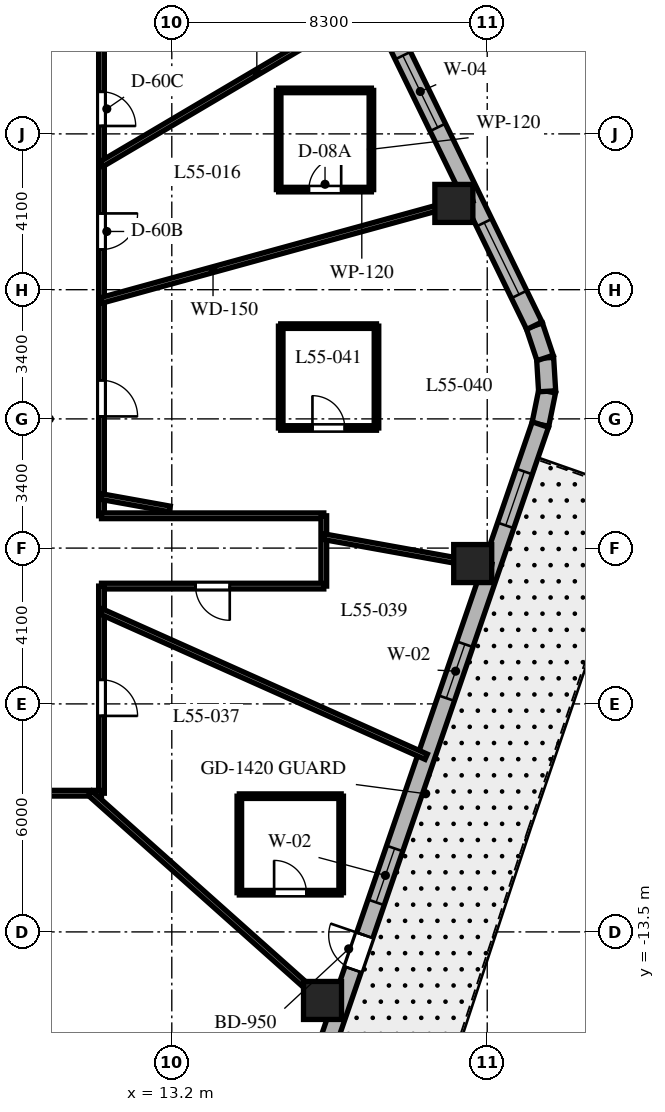
"""IFC4 building model, lengths in metres.
Left out: names, types, materials, properties, quantities, classifications, styles, units other than length and angle.
Written with IfcOpenShell. Run it as: python <this file> out.ifc"""

import sys

from ifc_helpers import new_model, si_unit, direction, frame, frame_2d, origin, origin_2d, place, context, subcontext, project, spatial, rectangle, extrude, element, fill, save


model = new_model("IFC4")
c1 = context("Model", 3, precision=1e-05, world=origin(), true_north=direction((0.0, 1.0)))
c2 = subcontext(c1, "Body", "Model", "MODEL_VIEW")
j1 = project(units=[si_unit("LENGTHUNIT", "METRE"), si_unit("PLANEANGLEUNIT", "RADIAN")], contexts=[c1])
p1 = place(None, origin())
s1 = spatial("IfcSite", under=j1, at=p1, CompositionType="ELEMENT")
p2 = place(p1, origin())
s2 = spatial("IfcBuilding", under=s1, at=p2, CompositionType="ELEMENT")
p3 = place(p2, frame((0.0, 0.0, 221.7)))
s3 = spatial("IfcBuildingStorey", under=s2, at=p3, CompositionType="ELEMENT", Elevation=221.7)
for number, where, z_axis, x_axis in (
    (1, (17.166, -15.304, 0.0), (0.0, 0.0, 1.0), (1.0, 0.0, 0.0)),
    (2, (21.118, -3.807, 0.0), (0.0, 0.0, 1.0), (1.0, 0.0, 0.0)),
    (3, (20.622, 5.67, 0.0), (0.0, 0.0, 1.0), (1.0, 0.0, 0.0)),
):
    element("IfcColumn", number, at=place(p3, frame(where, z_axis=z_axis, x_axis=x_axis)), inside=s3, PredefinedType="COLUMN", context=c2, shape_type="SweptSolid", body=[
        extrude(rectangle(XDim=1.0, YDim=1.0, at=origin_2d()), origin(), (0.0, 0.0, 1.0), 3.8),
    ])
p4 = place(p3, frame((22.898, -0.15, 0.0), z_axis=(0.0, 0.0, 1.0), x_axis=(0.199055826889, 0.979988151858, 0.0)))
e4 = element("IfcWall", 4, at=p4, inside=s3, PredefinedType="SOLIDWALL", context=c2, shape_type="SweptSolid", body=[
    extrude(rectangle(XDim=0.894, YDim=0.45, at=frame_2d((0.447, 0.0))), origin(), (0.0, 0.0, 1.0), 3.5),
])
p5 = place(p3, frame((23.076, 0.727, 0.0), z_axis=(0.0, 0.0, 1.0), x_axis=(-0.060805222108, 0.998149650586, 0.0)))
e5 = element("IfcWall", 5, at=p5, inside=s3, PredefinedType="SOLIDWALL", context=c2, shape_type="SweptSolid", body=[
    extrude(rectangle(XDim=0.879, YDim=0.45, at=frame_2d((0.44, 0.0))), origin(), (0.0, 0.0, 1.0), 3.5),
])
p6 = place(p3, frame((23.023, 1.604, 0.0), z_axis=(0.0, 0.0, 1.0), x_axis=(-0.316801227695, 0.948491951537, 0.0)))
e6 = element("IfcWall", 6, at=p6, inside=s3, PredefinedType="SOLIDWALL", context=c2, shape_type="SweptSolid", body=[
    extrude(rectangle(XDim=0.894, YDim=0.45, at=frame_2d((0.447, 0.0))), origin(), (0.0, 0.0, 1.0), 3.5),
])
p7 = place(p3, frame((16.324, -19.275, 0.0), z_axis=(0.0, 0.0, 1.0), x_axis=(0.325083142304, 0.945685439557, 0.0)))
e7 = element("IfcWall", 7, at=p7, inside=s3, PredefinedType="SOLIDWALL", context=c2, shape_type="SweptSolid", body=[
    extrude(rectangle(XDim=20.224, YDim=0.45, at=frame_2d((10.112, 0.0))), origin(), (0.0, 0.0, 1.0), 3.5),
])
p8 = place(p7, frame((5.062, 0.0, 0.0)))
e8 = element("IfcOpeningElement", 8, at=p8, cuts=e7, PredefinedType="OPENING", context=c2, shape_type="SweptSolid", body=[
    extrude(rectangle(XDim=0.95, YDim=2.15, at=frame_2d((0.475, 1.075))), frame((0.0, 0.235, 0.0), z_axis=(0.0, -1.0, 0.0), x_axis=(1.0, 0.0, 0.0)), (0.0, 0.0, 1.0), 0.47),
])
p9 = place(p7, frame((1.253, 0.0, 0.8)))
e9 = element("IfcOpeningElement", 9, at=p9, cuts=e7, PredefinedType="OPENING", context=c2, shape_type="SweptSolid", body=[
    extrude(rectangle(XDim=1.5, YDim=1.8, at=frame_2d((0.75, 0.9))), frame((0.0, 0.235, 0.0), z_axis=(0.0, -1.0, 0.0), x_axis=(1.0, 0.0, 0.0)), (0.0, 0.0, 1.0), 0.47),
])
p10 = place(p7, frame((6.929, 0.0, 0.8)))
e10 = element("IfcOpeningElement", 10, at=p10, cuts=e7, PredefinedType="OPENING", context=c2, shape_type="SweptSolid", body=[
    extrude(rectangle(XDim=1.5, YDim=1.8, at=frame_2d((0.75, 0.9))), frame((0.0, 0.235, 0.0), z_axis=(0.0, -1.0, 0.0), x_axis=(1.0, 0.0, 0.0)), (0.0, 0.0, 1.0), 0.47),
])
p11 = place(p7, frame((12.612, 0.0, 0.8)))
e11 = element("IfcOpeningElement", 11, at=p11, cuts=e7, PredefinedType="OPENING", context=c2, shape_type="SweptSolid", body=[
    extrude(rectangle(XDim=1.5, YDim=1.8, at=frame_2d((0.75, 0.9))), frame((0.0, 0.235, 0.0), z_axis=(0.0, -1.0, 0.0), x_axis=(1.0, 0.0, 0.0)), (0.0, 0.0, 1.0), 0.47),
])
p12 = place(p7, frame((17.418, 0.0, 0.8)))
e12 = element("IfcOpeningElement", 12, at=p12, cuts=e7, PredefinedType="OPENING", context=c2, shape_type="SweptSolid", body=[
    extrude(rectangle(XDim=1.5, YDim=1.8, at=frame_2d((0.75, 0.9))), frame((0.0, 0.235, 0.0), z_axis=(0.0, -1.0, 0.0), x_axis=(1.0, 0.0, 0.0)), (0.0, 0.0, 1.0), 0.47),
])
p13 = place(p3, frame((22.74, 2.452, 0.0), z_axis=(0.0, 0.0, 1.0), x_axis=(-0.437753424814, 0.899095066755, 0.0)))
e13 = element("IfcWall", 13, at=p13, inside=s3, PredefinedType="SOLIDWALL", context=c2, shape_type="SweptSolid", body=[
    extrude(rectangle(XDim=19.137, YDim=0.45, at=frame_2d((9.569, 0.0))), origin(), (0.0, 0.0, 1.0), 3.5),
])
p14 = place(p13, frame((5.805, 0.0, 0.8)))
e14 = element("IfcOpeningElement", 14, at=p14, cuts=e13, PredefinedType="OPENING", context=c2, shape_type="SweptSolid", body=[
    extrude(rectangle(XDim=2.1, YDim=1.85, at=frame_2d((1.05, 0.925))), frame((0.0, 0.235, 0.0), z_axis=(0.0, -1.0, 0.0), x_axis=(1.0, 0.0, 0.0)), (0.0, 0.0, 1.0), 0.47),
])
p15 = place(p13, frame((11.199, 0.0, 0.8)))
e15 = element("IfcOpeningElement", 15, at=p15, cuts=e13, PredefinedType="OPENING", context=c2, shape_type="SweptSolid", body=[
    extrude(rectangle(XDim=2.1, YDim=1.85, at=frame_2d((1.05, 0.925))), frame((0.0, 0.235, 0.0), z_axis=(0.0, -1.0, 0.0), x_axis=(1.0, 0.0, 0.0)), (0.0, 0.0, 1.0), 0.47),
])
p16 = place(p13, frame((16.173, 0.0, 0.8)))
e16 = element("IfcOpeningElement", 16, at=p16, cuts=e13, PredefinedType="OPENING", context=c2, shape_type="SweptSolid", body=[
    extrude(rectangle(XDim=2.1, YDim=1.85, at=frame_2d((1.05, 0.925))), frame((0.0, 0.235, 0.0), z_axis=(0.0, -1.0, 0.0), x_axis=(1.0, 0.0, 0.0)), (0.0, 0.0, 1.0), 0.47),
])
p17 = place(p13, frame((0.916, 0.0, 0.8)))
e17 = element("IfcOpeningElement", 17, at=p17, cuts=e13, PredefinedType="OPENING", context=c2, shape_type="SweptSolid", body=[
    extrude(rectangle(XDim=2.1, YDim=1.85, at=frame_2d((1.05, 0.925))), frame((0.0, 0.235, 0.0), z_axis=(0.0, -1.0, 0.0), x_axis=(1.0, 0.0, 0.0)), (0.0, 0.0, 1.0), 0.47),
])
p18 = place(p3, frame((11.35, 9.85, 0.0), z_axis=(0.0, 0.0, 1.0), x_axis=(0.0, -1.0, 0.0)))
e18 = element("IfcWall", 18, at=p18, inside=s3, PredefinedType="PARTITIONING", context=c2, shape_type="SweptSolid", body=[
    extrude(rectangle(XDim=12.4, YDim=0.15, at=frame_2d((6.2, 0.0))), origin(), (0.0, 0.0, 1.0), 2.99),
])
p19 = place(p18, frame((4.443, 0.0, 0.0)))
e19 = element("IfcOpeningElement", 19, at=p19, cuts=e18, PredefinedType="OPENING", context=c2, shape_type="SweptSolid", body=[
    extrude(rectangle(XDim=0.95, YDim=2.03, at=frame_2d((0.475, 1.015))), frame((0.0, 0.085, 0.0), z_axis=(0.0, -1.0, 0.0), x_axis=(1.0, 0.0, 0.0)), (0.0, 0.0, 1.0), 0.17),
])
p20 = place(p18, frame((1.242, 0.0, 0.0)))
e20 = element("IfcOpeningElement", 20, at=p20, cuts=e18, PredefinedType="OPENING", context=c2, shape_type="SweptSolid", body=[
    extrude(rectangle(XDim=0.9, YDim=2.03, at=frame_2d((0.45, 1.015))), frame((0.0, 0.085, 0.0), z_axis=(0.0, -1.0, 0.0), x_axis=(1.0, 0.0, 0.0)), (0.0, 0.0, 1.0), 0.17),
])
p21 = place(p18, frame((8.835, 0.0, 0.0)))
e21 = element("IfcOpeningElement", 21, at=p21, cuts=e18, PredefinedType="OPENING", context=c2, shape_type="SweptSolid", body=[
    extrude(rectangle(XDim=0.95, YDim=2.03, at=frame_2d((0.475, 1.015))), frame((0.0, 0.085, 0.0), z_axis=(0.0, -1.0, 0.0), x_axis=(1.0, 0.0, 0.0)), (0.0, 0.0, 1.0), 0.17),
])
p22 = place(p3, frame((11.35, -2.55, 0.0), z_axis=(0.0, 0.0, 1.0), x_axis=(1.0, 0.0, 0.0)))
e22 = element("IfcWall", 22, at=p22, inside=s3, PredefinedType="PARTITIONING", context=c2, shape_type="SweptSolid", body=[
    extrude(rectangle(XDim=5.85, YDim=0.15, at=frame_2d((2.925, 0.0))), origin(), (0.0, 0.0, 1.0), 2.94),
])
p23 = place(p3, frame((17.2, -2.55, 0.0), z_axis=(0.0, 0.0, 1.0), x_axis=(0.0, -1.0, 0.0)))
e23 = element("IfcWall", 23, at=p23, inside=s3, PredefinedType="PARTITIONING", context=c2, shape_type="SweptSolid", body=[
    extrude(rectangle(XDim=1.85, YDim=0.15, at=frame_2d((0.925, 0.0))), origin(), (0.0, 0.0, 1.0), 2.94),
])
p24 = place(p3, frame((17.2, -4.4, 0.0), z_axis=(0.0, 0.0, 1.0), x_axis=(-1.0, 0.0, 0.0)))
e24 = element("IfcWall", 24, at=p24, inside=s3, PredefinedType="PARTITIONING", context=c2, shape_type="SweptSolid", body=[
    extrude(rectangle(XDim=5.85, YDim=0.15, at=frame_2d((2.925, 0.0))), origin(), (0.0, 0.0, 1.0), 2.94),
])
p25 = place(p24, frame((2.475, 0.0, 0.0)))
e25 = element("IfcOpeningElement", 25, at=p25, cuts=e24, PredefinedType="OPENING", context=c2, shape_type="SweptSolid", body=[
    extrude(rectangle(XDim=0.9, YDim=2.03, at=frame_2d((0.45, 1.015))), frame((0.0, 0.085, 0.0), z_axis=(0.0, -1.0, 0.0), x_axis=(1.0, 0.0, 0.0)), (0.0, 0.0, 1.0), 0.17),
])
p26 = place(p3, frame((11.35, -4.4, 0.0), z_axis=(0.0, 0.0, 1.0), x_axis=(0.0, -1.0, 0.0)))
e26 = element("IfcWall", 26, at=p26, inside=s3, PredefinedType="PARTITIONING", context=c2, shape_type="SweptSolid", body=[
    extrude(rectangle(XDim=5.45, YDim=0.15, at=frame_2d((2.725, 0.0))), origin(), (0.0, 0.0, 1.0), 2.99),
])
p27 = place(p26, frame((2.466, 0.0, 0.0)))
e27 = element("IfcOpeningElement", 27, at=p27, cuts=e26, PredefinedType="OPENING", context=c2, shape_type="SweptSolid", body=[
    extrude(rectangle(XDim=0.95, YDim=2.03, at=frame_2d((0.475, 1.015))), frame((0.0, 0.085, 0.0), z_axis=(0.0, -1.0, 0.0), x_axis=(1.0, 0.0, 0.0)), (0.0, 0.0, 1.0), 0.17),
])
p28 = place(p3, frame((11.35, -9.85, 0.0), z_axis=(0.0, 0.0, 1.0), x_axis=(-1.0, 0.0, 0.0)))
e28 = element("IfcWall", 28, at=p28, inside=s3, PredefinedType="PARTITIONING", context=c2, shape_type="SweptSolid", body=[
    extrude(rectangle(XDim=10.43, YDim=0.15, at=frame_2d((5.215, 0.0))), origin(), (0.0, 0.0, 1.0), 2.99),
])
p29 = place(p28, frame((8.362, 0.0, 0.0)))
e29 = element("IfcOpeningElement", 29, at=p29, cuts=e28, PredefinedType="OPENING", context=c2, shape_type="SweptSolid", body=[
    extrude(rectangle(XDim=0.95, YDim=2.03, at=frame_2d((0.475, 1.015))), frame((0.0, 0.085, 0.0), z_axis=(0.0, -1.0, 0.0), x_axis=(1.0, 0.0, 0.0)), (0.0, 0.0, 1.0), 0.17),
])
p30 = place(p28, frame((3.396, 0.0, 0.0)))
e30 = element("IfcOpeningElement", 30, at=p30, cuts=e28, PredefinedType="OPENING", context=c2, shape_type="SweptSolid", body=[
    extrude(rectangle(XDim=0.95, YDim=2.03, at=frame_2d((0.475, 1.015))), frame((0.0, 0.085, 0.0), z_axis=(0.0, -1.0, 0.0), x_axis=(1.0, 0.0, 0.0)), (0.0, 0.0, 1.0), 0.17),
])
p31 = place(p3, frame((11.35, 3.121, 0.0), z_axis=(0.0, 0.0, 1.0), x_axis=(0.964212793822, 0.265129568758, 0.0)))
e31 = element("IfcWall", 31, at=p31, inside=s3, PredefinedType="PARTITIONING", context=c2, shape_type="SweptSolid", body=[
    extrude(rectangle(XDim=10.12, YDim=0.15, at=frame_2d((5.06, 0.0))), origin(), (0.0, 0.0, 1.0), 2.74),
])
p32 = place(p3, frame((11.35, 6.705, 0.0), z_axis=(0.0, 0.0, 1.0), x_axis=(0.86097625004, 0.508645158108, 0.0)))
e32 = element("IfcWall", 32, at=p32, inside=s3, PredefinedType="PARTITIONING", context=c2, shape_type="SweptSolid", body=[
    extrude(rectangle(XDim=8.406, YDim=0.15, at=frame_2d((4.203, 0.0))), origin(), (0.0, 0.0, 1.0), 2.74),
])
p33 = place(p3, frame((11.048, -9.85, 0.0), z_axis=(0.0, 0.0, 1.0), x_axis=(0.746444434655, -0.665447748492, 0.0)))
e33 = element("IfcWall", 33, at=p33, inside=s3, PredefinedType="PARTITIONING", context=c2, shape_type="SweptSolid", body=[
    extrude(rectangle(XDim=8.732, YDim=0.15, at=frame_2d((4.366, 0.0))), origin(), (0.0, 0.0, 1.0), 2.74),
])
p34 = place(p3, frame((11.35, -5.072, 0.0), z_axis=(0.0, 0.0, 1.0), x_axis=(0.912980177983, -0.408003914944, 0.0)))
e34 = element("IfcWall", 34, at=p34, inside=s3, PredefinedType="PARTITIONING", context=c2, shape_type="SweptSolid", body=[
    extrude(rectangle(XDim=9.358, YDim=0.15, at=frame_2d((4.679, 0.0))), origin(), (0.0, 0.0, 1.0), 2.74),
])
p35 = place(p3, frame((11.35, -2.046, 0.0), z_axis=(0.0, 0.0, 1.0), x_axis=(0.984127783205, -0.177461281195, 0.0)))
e35 = element("IfcWall", 35, at=p35, inside=s3, PredefinedType="PARTITIONING", context=c2, shape_type="SweptSolid", body=[
    extrude(rectangle(XDim=1.826, YDim=0.15, at=frame_2d((0.913, 0.0))), origin(), (0.0, 0.0, 1.0), 3.5),
])
p36 = place(p3, frame((17.2, -3.101, 0.0), z_axis=(0.0, 0.0, 1.0), x_axis=(0.98413465883, -0.177423147559, 0.0)))
e36 = element("IfcWall", 36, at=p36, inside=s3, PredefinedType="PARTITIONING", context=c2, shape_type="SweptSolid", body=[
    extrude(rectangle(XDim=4.482, YDim=0.15, at=frame_2d((2.241, 0.0))), origin(), (0.0, 0.0, 1.0), 2.74),
])
p37 = place(p3, frame((16.012, 6.034, 0.0), z_axis=(0.0, 0.0, 1.0), x_axis=(1.0, 0.0, 0.0)))
e37 = element("IfcWall", 37, at=p37, inside=s3, PredefinedType="PARTITIONING", context=c2, shape_type="SweptSolid", body=[
    extrude(rectangle(XDim=2.44, YDim=0.12, at=frame_2d((1.22, 0.0))), origin(), (0.0, 0.0, 1.0), 2.94),
])
p38 = place(p37, frame((0.795, 0.0, 0.0)))
e38 = element("IfcOpeningElement", 38, at=p38, cuts=e37, PredefinedType="OPENING", context=c2, shape_type="SweptSolid", body=[
    extrude(rectangle(XDim=0.85, YDim=2.03, at=frame_2d((0.425, 1.015))), frame((0.0, 0.07, 0.0), z_axis=(0.0, -1.0, 0.0), x_axis=(1.0, 0.0, 0.0)), (0.0, 0.0, 1.0), 0.14),
])
p39 = place(p3, frame((18.452, 6.034, 0.0), z_axis=(0.0, 0.0, 1.0), x_axis=(0.0, 1.0, 0.0)))
e39 = element("IfcWall", 39, at=p39, inside=s3, PredefinedType="PARTITIONING", context=c2, shape_type="SweptSolid", body=[
    extrude(rectangle(XDim=2.61, YDim=0.12, at=frame_2d((1.305, 0.0))), origin(), (0.0, 0.0, 1.0), 2.99),
])
p40 = place(p3, frame((18.452, 8.644, 0.0), z_axis=(0.0, 0.0, 1.0), x_axis=(-1.0, 0.0, 0.0)))
e40 = element("IfcWall", 40, at=p40, inside=s3, PredefinedType="PARTITIONING", context=c2, shape_type="SweptSolid", body=[
    extrude(rectangle(XDim=2.44, YDim=0.12, at=frame_2d((1.22, 0.0))), origin(), (0.0, 0.0, 1.0), 3.5),
])
p41 = place(p3, frame((16.012, 8.644, 0.0), z_axis=(0.0, 0.0, 1.0), x_axis=(0.0, -1.0, 0.0)))
e41 = element("IfcWall", 41, at=p41, inside=s3, PredefinedType="PARTITIONING", context=c2, shape_type="SweptSolid", body=[
    extrude(rectangle(XDim=2.61, YDim=0.12, at=frame_2d((1.305, 0.0))), origin(), (0.0, 0.0, 1.0), 2.99),
])
p42 = place(p3, frame((14.977, -12.468, 0.0), z_axis=(0.0, 0.0, 1.0), x_axis=(1.0, 0.0, 0.0)))
e42 = element("IfcWall", 42, at=p42, inside=s3, PredefinedType="PARTITIONING", context=c2, shape_type="SweptSolid", body=[
    extrude(rectangle(XDim=2.68, YDim=0.12, at=frame_2d((1.34, 0.0))), origin(), (0.0, 0.0, 1.0), 3.5),
])
p43 = place(p42, frame((0.915, 0.0, 0.0)))
e43 = element("IfcOpeningElement", 43, at=p43, cuts=e42, PredefinedType="OPENING", context=c2, shape_type="SweptSolid", body=[
    extrude(rectangle(XDim=0.85, YDim=2.03, at=frame_2d((0.425, 1.015))), frame((0.0, 0.07, 0.0), z_axis=(0.0, -1.0, 0.0), x_axis=(1.0, 0.0, 0.0)), (0.0, 0.0, 1.0), 0.14),
])
p44 = place(p3, frame((17.657, -12.468, 0.0), z_axis=(0.0, 0.0, 1.0), x_axis=(0.0, 1.0, 0.0)))
e44 = element("IfcWall", 44, at=p44, inside=s3, PredefinedType="PARTITIONING", context=c2, shape_type="SweptSolid", body=[
    extrude(rectangle(XDim=2.54, YDim=0.12, at=frame_2d((1.27, 0.0))), origin(), (0.0, 0.0, 1.0), 3.5),
])
p45 = place(p3, frame((17.657, -9.928, 0.0), z_axis=(0.0, 0.0, 1.0), x_axis=(-1.0, 0.0, 0.0)))
e45 = element("IfcWall", 45, at=p45, inside=s3, PredefinedType="PARTITIONING", context=c2, shape_type="SweptSolid", body=[
    extrude(rectangle(XDim=2.68, YDim=0.12, at=frame_2d((1.34, 0.0))), origin(), (0.0, 0.0, 1.0), 3.073),
])
p46 = place(p3, frame((14.977, -9.928, 0.0), z_axis=(0.0, 0.0, 1.0), x_axis=(0.0, -1.0, 0.0)))
e46 = element("IfcWall", 46, at=p46, inside=s3, PredefinedType="PARTITIONING", context=c2, shape_type="SweptSolid", body=[
    extrude(rectangle(XDim=2.54, YDim=0.12, at=frame_2d((1.27, 0.0))), origin(), (0.0, 0.0, 1.0), 3.073),
])
p47 = place(p3, frame((16.066, -0.239, 0.0), z_axis=(0.0, 0.0, 1.0), x_axis=(1.0, 0.0, 0.0)))
e47 = element("IfcWall", 47, at=p47, inside=s3, PredefinedType="PARTITIONING", context=c2, shape_type="SweptSolid", body=[
    extrude(rectangle(XDim=2.52, YDim=0.12, at=frame_2d((1.26, 0.0))), origin(), (0.0, 0.0, 1.0), 2.94),
])
p48 = place(p47, frame((0.835, 0.0, 0.0)))
e48 = element("IfcOpeningElement", 48, at=p48, cuts=e47, PredefinedType="OPENING", context=c2, shape_type="SweptSolid", body=[
    extrude(rectangle(XDim=0.85, YDim=2.03, at=frame_2d((0.425, 1.015))), frame((0.0, 0.07, 0.0), z_axis=(0.0, -1.0, 0.0), x_axis=(1.0, 0.0, 0.0)), (0.0, 0.0, 1.0), 0.14),
])
p49 = place(p3, frame((18.586, -0.239, 0.0), z_axis=(0.0, 0.0, 1.0), x_axis=(0.0, 1.0, 0.0)))
e49 = element("IfcWall", 49, at=p49, inside=s3, PredefinedType="PARTITIONING", context=c2, shape_type="SweptSolid", body=[
    extrude(rectangle(XDim=2.68, YDim=0.12, at=frame_2d((1.34, 0.0))), origin(), (0.0, 0.0, 1.0), 3.5),
])
p50 = place(p3, frame((18.586, 2.441, 0.0), z_axis=(0.0, 0.0, 1.0), x_axis=(-1.0, 0.0, 0.0)))
e50 = element("IfcWall", 50, at=p50, inside=s3, PredefinedType="PARTITIONING", context=c2, shape_type="SweptSolid", body=[
    extrude(rectangle(XDim=2.52, YDim=0.12, at=frame_2d((1.26, 0.0))), origin(), (0.0, 0.0, 1.0), 2.94),
])
p51 = place(p3, frame((16.066, 2.441, 0.0), z_axis=(0.0, 0.0, 1.0), x_axis=(0.0, -1.0, 0.0)))
e51 = element("IfcWall", 51, at=p51, inside=s3, PredefinedType="PARTITIONING", context=c2, shape_type="SweptSolid", body=[
    extrude(rectangle(XDim=2.68, YDim=0.12, at=frame_2d((1.34, 0.0))), origin(), (0.0, 0.0, 1.0), 3.5),
])
p52 = place(p8, origin())
e52 = element("IfcDoor", 52, at=p52, inside=s3, OperationType="SINGLE_SWING_RIGHT", PredefinedType="DOOR", context=c2, shape_type="SweptSolid", body=[
    extrude(rectangle(XDim=0.95, YDim=2.15, at=frame_2d((0.475, 1.075))), frame((0.0, 0.025, 0.0), z_axis=(0.0, -1.0, 0.0), x_axis=(1.0, 0.0, 0.0)), (0.0, 0.0, 1.0), 0.05),
])
fill(e8, e52)
p53 = place(p10, origin())
e53 = element("IfcWindow", 53, at=p53, inside=s3, PartitioningType="SINGLE_PANEL", PredefinedType="WINDOW", context=c2, shape_type="SweptSolid", body=[
    extrude(rectangle(XDim=1.5, YDim=1.8, at=frame_2d((0.75, 0.9))), frame((0.0, 0.03, 0.0), z_axis=(0.0, -1.0, 0.0), x_axis=(1.0, 0.0, 0.0)), (0.0, 0.0, 1.0), 0.06),
])
fill(e10, e53)
p54 = place(p11, origin())
e54 = element("IfcWindow", 54, at=p54, inside=s3, PartitioningType="SINGLE_PANEL", PredefinedType="WINDOW", context=c2, shape_type="SweptSolid", body=[
    extrude(rectangle(XDim=1.5, YDim=1.8, at=frame_2d((0.75, 0.9))), frame((0.0, 0.03, 0.0), z_axis=(0.0, -1.0, 0.0), x_axis=(1.0, 0.0, 0.0)), (0.0, 0.0, 1.0), 0.06),
])
fill(e11, e54)
p55 = place(p12, origin())
e55 = element("IfcWindow", 55, at=p55, inside=s3, PartitioningType="SINGLE_PANEL", PredefinedType="WINDOW", context=c2, shape_type="SweptSolid", body=[
    extrude(rectangle(XDim=1.5, YDim=1.8, at=frame_2d((0.75, 0.9))), frame((0.0, 0.03, 0.0), z_axis=(0.0, -1.0, 0.0), x_axis=(1.0, 0.0, 0.0)), (0.0, 0.0, 1.0), 0.06),
])
fill(e12, e55)
p56 = place(p14, origin())
e56 = element("IfcWindow", 56, at=p56, inside=s3, PartitioningType="SINGLE_PANEL", PredefinedType="WINDOW", context=c2, shape_type="SweptSolid", body=[
    extrude(rectangle(XDim=2.1, YDim=1.85, at=frame_2d((1.05, 0.925))), frame((0.0, 0.03, 0.0), z_axis=(0.0, -1.0, 0.0), x_axis=(1.0, 0.0, 0.0)), (0.0, 0.0, 1.0), 0.06),
])
fill(e14, e56)
p57 = place(p17, origin())
e57 = element("IfcWindow", 57, at=p57, inside=s3, PartitioningType="SINGLE_PANEL", PredefinedType="WINDOW", context=c2, shape_type="SweptSolid", body=[
    extrude(rectangle(XDim=2.1, YDim=1.85, at=frame_2d((1.05, 0.925))), frame((0.0, 0.03, 0.0), z_axis=(0.0, -1.0, 0.0), x_axis=(1.0, 0.0, 0.0)), (0.0, 0.0, 1.0), 0.06),
])
fill(e17, e57)
p58 = place(p19, origin())
e58 = element("IfcDoor", 58, at=p58, inside=s3, OperationType="SINGLE_SWING_LEFT", PredefinedType="DOOR", context=c2, shape_type="SweptSolid", body=[
    extrude(rectangle(XDim=0.95, YDim=2.03, at=frame_2d((0.475, 1.015))), frame((0.0, 0.025, 0.0), z_axis=(0.0, -1.0, 0.0), x_axis=(1.0, 0.0, 0.0)), (0.0, 0.0, 1.0), 0.05),
])
fill(e19, e58)
p59 = place(p38, origin())
e59 = element("IfcDoor", 59, at=p59, inside=s3, OperationType="SINGLE_SWING_RIGHT", PredefinedType="DOOR", context=c2, shape_type="SweptSolid", body=[
    extrude(rectangle(XDim=0.85, YDim=2.03, at=frame_2d((0.425, 1.015))), frame((0.0, 0.025, 0.0), z_axis=(0.0, -1.0, 0.0), x_axis=(1.0, 0.0, 0.0)), (0.0, 0.0, 1.0), 0.05),
])
fill(e38, e59)
p60 = place(p20, origin())
e60 = element("IfcDoor", 60, at=p60, inside=s3, OperationType="SINGLE_SWING_RIGHT", PredefinedType="DOOR", context=c2, shape_type="SweptSolid", body=[
    extrude(rectangle(XDim=0.9, YDim=2.03, at=frame_2d((0.45, 1.015))), frame((0.0, 0.025, 0.0), z_axis=(0.0, -1.0, 0.0), x_axis=(1.0, 0.0, 0.0)), (0.0, 0.0, 1.0), 0.05),
])
fill(e20, e60)
p61 = place(p27, origin())
e61 = element("IfcDoor", 61, at=p61, inside=s3, OperationType="SINGLE_SWING_RIGHT", PredefinedType="DOOR", context=c2, shape_type="SweptSolid", body=[
    extrude(rectangle(XDim=0.95, YDim=2.03, at=frame_2d((0.475, 1.015))), frame((0.0, 0.025, 0.0), z_axis=(0.0, -1.0, 0.0), x_axis=(1.0, 0.0, 0.0)), (0.0, 0.0, 1.0), 0.05),
])
fill(e27, e61)
p62 = place(p43, origin())
e62 = element("IfcDoor", 62, at=p62, inside=s3, OperationType="SINGLE_SWING_LEFT", PredefinedType="DOOR", context=c2, shape_type="SweptSolid", body=[
    extrude(rectangle(XDim=0.85, YDim=2.03, at=frame_2d((0.425, 1.015))), frame((0.0, 0.025, 0.0), z_axis=(0.0, -1.0, 0.0), x_axis=(1.0, 0.0, 0.0)), (0.0, 0.0, 1.0), 0.05),
])
fill(e43, e62)
p63 = place(p25, origin())
e63 = element("IfcDoor", 63, at=p63, inside=s3, OperationType="SINGLE_SWING_LEFT", PredefinedType="DOOR", context=c2, shape_type="SweptSolid", body=[
    extrude(rectangle(XDim=0.9, YDim=2.03, at=frame_2d((0.45, 1.015))), frame((0.0, 0.025, 0.0), z_axis=(0.0, -1.0, 0.0), x_axis=(1.0, 0.0, 0.0)), (0.0, 0.0, 1.0), 0.05),
])
fill(e25, e63)
p64 = place(p21, origin())
e64 = element("IfcDoor", 64, at=p64, inside=s3, OperationType="SINGLE_SWING_RIGHT", PredefinedType="DOOR", context=c2, shape_type="SweptSolid", body=[
    extrude(rectangle(XDim=0.95, YDim=2.03, at=frame_2d((0.475, 1.015))), frame((0.0, 0.025, 0.0), z_axis=(0.0, -1.0, 0.0), x_axis=(1.0, 0.0, 0.0)), (0.0, 0.0, 1.0), 0.05),
])
fill(e21, e64)
p65 = place(p48, origin())
e65 = element("IfcDoor", 65, at=p65, inside=s3, OperationType="SINGLE_SWING_LEFT", PredefinedType="DOOR", context=c2, shape_type="SweptSolid", body=[
    extrude(rectangle(XDim=0.85, YDim=2.03, at=frame_2d((0.425, 1.015))), frame((0.0, 0.025, 0.0), z_axis=(0.0, -1.0, 0.0), x_axis=(1.0, 0.0, 0.0)), (0.0, 0.0, 1.0), 0.05),
])
fill(e48, e65)
save(model, sys.argv[1])
